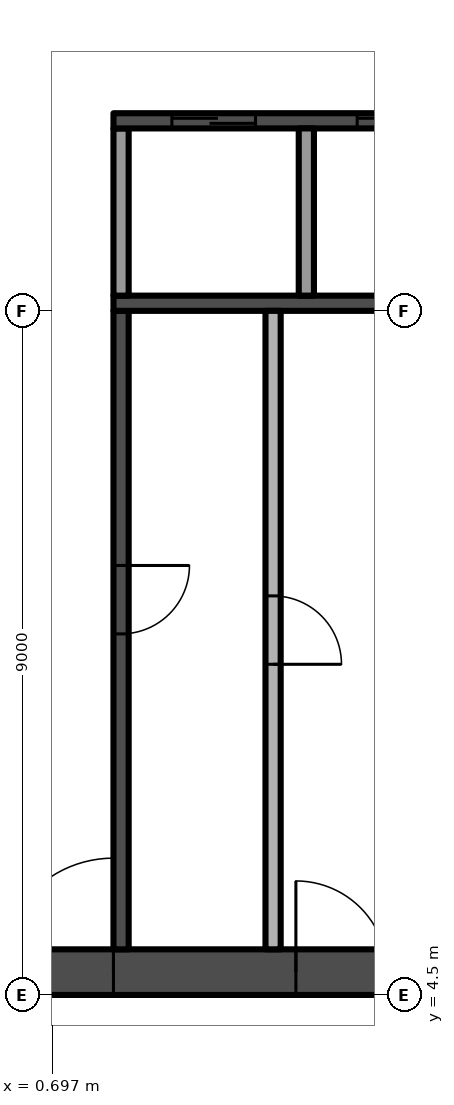
"""IFC4 building model, lengths in metres.
Left out: names, types, materials, properties, quantities, classifications, styles, units other than length and angle.
Written with IfcOpenShell. Run it as: python <this file> out.ifc"""

import sys

from ifc_helpers import new_model, si_unit, direction, frame, frame_2d, origin, place, context, subcontext, project, spatial, rectangle, extrude, element, fill, save


model = new_model("IFC4")
c1 = context("Model", 3, precision=1e-05, world=origin(), true_north=direction((0.0, 1.0)))
c2 = subcontext(c1, "Body", "Model", "MODEL_VIEW")
j1 = project(units=[si_unit("LENGTHUNIT", "METRE"), si_unit("PLANEANGLEUNIT", "RADIAN")], contexts=[c1])
p1 = place(None, origin())
s1 = spatial("IfcSite", under=j1, at=p1, CompositionType="ELEMENT")
p2 = place(p1, origin())
s2 = spatial("IfcBuilding", under=s1, at=p2, CompositionType="ELEMENT")
p3 = place(p2, frame((0.0, 0.0, 273.0)))
s3 = spatial("IfcBuildingStorey", under=s2, at=p3, CompositionType="ELEMENT", Elevation=273.0)
p4 = place(p3, frame((-13.5, 4.8, -0.3), z_axis=(0.0, 0.0, 1.0), x_axis=(1.0, 0.0, 0.0)))
e1 = element("IfcWall", 1, at=p4, inside=s3, PredefinedType="SHEAR", context=c2, shape_type="SweptSolid", body=[
    extrude(rectangle(XDim=27.0, YDim=0.6, at=frame_2d((13.5, 0.0))), origin(), (0.0, 0.0, 1.0), 3.8),
])
p5 = place(p4, frame((12.0, 0.0, 0.3)))
e2 = element("IfcOpeningElement", 2, at=p5, cuts=e1, PredefinedType="OPENING", context=c2, shape_type="SweptSolid", body=[
    extrude(rectangle(XDim=3.0, YDim=2.4, at=frame_2d((1.5, 1.2))), frame((0.0, 0.31, 0.0), z_axis=(0.0, -1.0, 0.0), x_axis=(1.0, 0.0, 0.0)), (0.0, 0.0, 1.0), 0.62),
])
p6 = place(p4, frame((4.9, 0.0, 0.3)))
e3 = element("IfcOpeningElement", 3, at=p6, cuts=e1, PredefinedType="OPENING", context=c2, shape_type="SweptSolid", body=[
    extrude(rectangle(XDim=1.2, YDim=2.2, at=frame_2d((0.6, 1.1))), frame((0.0, 0.31, 0.0), z_axis=(0.0, -1.0, 0.0), x_axis=(1.0, 0.0, 0.0)), (0.0, 0.0, 1.0), 0.62),
])
p7 = place(p4, frame((20.75, 0.0, 0.3)))
e4 = element("IfcOpeningElement", 4, at=p7, cuts=e1, PredefinedType="OPENING", context=c2, shape_type="SweptSolid", body=[
    extrude(rectangle(XDim=1.5, YDim=2.2, at=frame_2d((0.75, 1.1))), frame((0.0, 0.31, 0.0), z_axis=(0.0, -1.0, 0.0), x_axis=(1.0, 0.0, 0.0)), (0.0, 0.0, 1.0), 0.62),
])
p8 = place(p4, frame((17.4, 0.0, 0.3)))
e5 = element("IfcOpeningElement", 5, at=p8, cuts=e1, PredefinedType="OPENING", context=c2, shape_type="SweptSolid", body=[
    extrude(rectangle(XDim=1.2, YDim=2.2, at=frame_2d((0.6, 1.1))), frame((0.0, 0.31, 0.0), z_axis=(0.0, -1.0, 0.0), x_axis=(1.0, 0.0, 0.0)), (0.0, 0.0, 1.0), 0.62),
])
p9 = place(p3, frame((1.6, 13.5, 0.0), z_axis=(0.0, 0.0, 1.0), x_axis=(0.0, -1.0, 0.0)))
e6 = element("IfcWall", 6, at=p9, inside=s3, PredefinedType="SHEAR", context=c2, shape_type="SweptSolid", body=[
    extrude(rectangle(XDim=8.4, YDim=0.2, at=frame_2d((4.2, 0.0))), origin(), (0.0, 0.0, 1.0), 3.5),
])
p10 = place(p9, frame((3.35, 0.0, 0.0)))
e7 = element("IfcOpeningElement", 7, at=p10, cuts=e6, PredefinedType="OPENING", context=c2, shape_type="SweptSolid", body=[
    extrude(rectangle(XDim=0.9, YDim=2.1, at=frame_2d((0.45, 1.05))), frame((0.0, 0.11, 0.0), z_axis=(0.0, -1.0, 0.0), x_axis=(1.0, 0.0, 0.0)), (0.0, 0.0, 1.0), 0.22),
])
p11 = place(p3, frame((1.5, 13.6, 0.0), z_axis=(0.0, 0.0, 1.0), x_axis=(1.0, 0.0, 0.0)))
e8 = element("IfcWall", 8, at=p11, inside=s3, PredefinedType="SHEAR", context=c2, shape_type="SweptSolid", body=[
    extrude(rectangle(XDim=5.075, YDim=0.2, at=frame_2d((2.538, 0.0))), origin(), (0.0, 0.0, 1.0), 3.5),
])
p12 = place(p3, frame((1.6, 13.7, 0.0), z_axis=(0.0, 0.0, 1.0), x_axis=(0.0, 1.0, 0.0)))
e9 = element("IfcWall", 9, at=p12, inside=s3, PredefinedType="PARTITIONING", context=c2, shape_type="SweptSolid", body=[
    extrude(rectangle(XDim=2.2, YDim=0.2, at=frame_2d((1.1, 0.0))), origin(), (0.0, 0.0, 1.0), 3.5),
])
p13 = place(p3, frame((9.85, 16.0, 0.0), z_axis=(0.0, 0.0, 1.0), x_axis=(-1.0, 0.0, 0.0)))
e10 = element("IfcWall", 10, at=p13, inside=s3, PredefinedType="SHEAR", context=c2, shape_type="SweptSolid", body=[
    extrude(rectangle(XDim=8.35, YDim=0.2, at=frame_2d((4.175, 0.0))), origin(), (0.0, 0.0, 1.0), 3.5),
])
p14 = place(p13, frame((6.481, 0.0, 0.0)))
e11 = element("IfcOpeningElement", 11, at=p14, cuts=e10, PredefinedType="OPENING", context=c2, shape_type="SweptSolid", body=[
    extrude(rectangle(XDim=1.1, YDim=2.1, at=frame_2d((0.55, 1.05))), frame((0.0, 0.11, 0.0), z_axis=(0.0, -1.0, 0.0), x_axis=(1.0, 0.0, 0.0)), (0.0, 0.0, 1.0), 0.22),
])
p15 = place(p13, frame((4.044, 0.0, 0.0)))
e12 = element("IfcOpeningElement", 12, at=p15, cuts=e10, PredefinedType="OPENING", context=c2, shape_type="SweptSolid", body=[
    extrude(rectangle(XDim=1.1, YDim=2.1, at=frame_2d((0.55, 1.05))), frame((0.0, 0.11, 0.0), z_axis=(0.0, -1.0, 0.0), x_axis=(1.0, 0.0, 0.0)), (0.0, 0.0, 1.0), 0.22),
])
p16 = place(p13, frame((1.288, 0.0, 0.0)))
e13 = element("IfcOpeningElement", 13, at=p16, cuts=e10, PredefinedType="OPENING", context=c2, shape_type="SweptSolid", body=[
    extrude(rectangle(XDim=0.9, YDim=2.1, at=frame_2d((0.45, 1.05))), frame((0.0, 0.11, 0.0), z_axis=(0.0, -1.0, 0.0), x_axis=(1.0, 0.0, 0.0)), (0.0, 0.0, 1.0), 0.22),
])
p17 = place(p3, frame((3.6, 13.5, 0.0), z_axis=(0.0, 0.0, 1.0), x_axis=(0.0, -1.0, 0.0)))
e14 = element("IfcWall", 14, at=p17, inside=s3, PredefinedType="PARTITIONING", context=c2, shape_type="SweptSolid", body=[
    extrude(rectangle(XDim=8.4, YDim=0.2, at=frame_2d((4.2, 0.0))), origin(), (0.0, 0.0, 1.0), 3.5),
])
p18 = place(p17, frame((3.75, 0.0, 0.0)))
e15 = element("IfcOpeningElement", 15, at=p18, cuts=e14, PredefinedType="OPENING", context=c2, shape_type="SweptSolid", body=[
    extrude(rectangle(XDim=0.9, YDim=2.1, at=frame_2d((0.45, 1.05))), frame((0.0, 0.11, 0.0), z_axis=(0.0, -1.0, 0.0), x_axis=(1.0, 0.0, 0.0)), (0.0, 0.0, 1.0), 0.22),
])
p19 = place(p3, frame((4.037, 13.7, 0.0), z_axis=(0.0, 0.0, 1.0), x_axis=(0.0, 1.0, 0.0)))
e16 = element("IfcWall", 16, at=p19, inside=s3, PredefinedType="PARTITIONING", context=c2, shape_type="SweptSolid", body=[
    extrude(rectangle(XDim=2.2, YDim=0.2, at=frame_2d((1.1, 0.0))), origin(), (0.0, 0.0, 1.0), 3.5),
])
p20 = place(p5, frame((3.0, 0.0, 0.0), z_axis=(0.0, 0.0, 1.0), x_axis=(-1.0, 0.0, 0.0)))
e17 = element("IfcDoor", 17, at=p20, inside=s3, OperationType="DOUBLE_DOOR_SINGLE_SWING", PredefinedType="DOOR", context=c2, shape_type="SweptSolid", body=[
    extrude(rectangle(XDim=3.0, YDim=2.4, at=frame_2d((1.5, 1.2))), frame((0.0, 0.025, 0.0), z_axis=(0.0, -1.0, 0.0), x_axis=(1.0, 0.0, 0.0)), (0.0, 0.0, 1.0), 0.05),
])
fill(e2, e17)
p21 = place(p8, frame((1.2, 0.0, 0.0), z_axis=(0.0, 0.0, 1.0), x_axis=(-1.0, 0.0, 0.0)))
e18 = element("IfcDoor", 18, at=p21, inside=s3, OperationType="SINGLE_SWING_RIGHT", PredefinedType="DOOR", context=c2, shape_type="SweptSolid", body=[
    extrude(rectangle(XDim=1.2, YDim=2.2, at=frame_2d((0.6, 1.1))), frame((0.0, 0.025, 0.0), z_axis=(0.0, -1.0, 0.0), x_axis=(1.0, 0.0, 0.0)), (0.0, 0.0, 1.0), 0.05),
])
fill(e5, e18)
p22 = place(p14, origin())
e19 = element("IfcDoor", 19, at=p22, inside=s3, OperationType="SLIDING_TO_RIGHT", PredefinedType="DOOR", context=c2, shape_type="SweptSolid", body=[
    extrude(rectangle(XDim=1.1, YDim=2.1, at=frame_2d((0.55, 1.05))), frame((0.0, 0.025, 0.0), z_axis=(0.0, -1.0, 0.0), x_axis=(1.0, 0.0, 0.0)), (0.0, 0.0, 1.0), 0.05),
])
fill(e11, e19)
p23 = place(p15, origin())
e20 = element("IfcDoor", 20, at=p23, inside=s3, OperationType="SLIDING_TO_RIGHT", PredefinedType="DOOR", context=c2, shape_type="SweptSolid", body=[
    extrude(rectangle(XDim=1.1, YDim=2.1, at=frame_2d((0.55, 1.05))), frame((0.0, 0.025, 0.0), z_axis=(0.0, -1.0, 0.0), x_axis=(1.0, 0.0, 0.0)), (0.0, 0.0, 1.0), 0.05),
])
fill(e12, e20)
p24 = place(p10, origin())
e21 = element("IfcDoor", 21, at=p24, inside=s3, OperationType="SINGLE_SWING_LEFT", PredefinedType="DOOR", context=c2, shape_type="SweptSolid", body=[
    extrude(rectangle(XDim=0.9, YDim=2.1, at=frame_2d((0.45, 1.05))), frame((0.0, 0.025, 0.0), z_axis=(0.0, -1.0, 0.0), x_axis=(1.0, 0.0, 0.0)), (0.0, 0.0, 1.0), 0.05),
])
fill(e7, e21)
p25 = place(p18, origin())
e22 = element("IfcDoor", 22, at=p25, inside=s3, OperationType="SINGLE_SWING_RIGHT", PredefinedType="DOOR", context=c2, shape_type="SweptSolid", body=[
    extrude(rectangle(XDim=0.9, YDim=2.1, at=frame_2d((0.45, 1.05))), frame((0.0, 0.025, 0.0), z_axis=(0.0, -1.0, 0.0), x_axis=(1.0, 0.0, 0.0)), (0.0, 0.0, 1.0), 0.05),
])
fill(e15, e22)
save(model, sys.argv[1])
